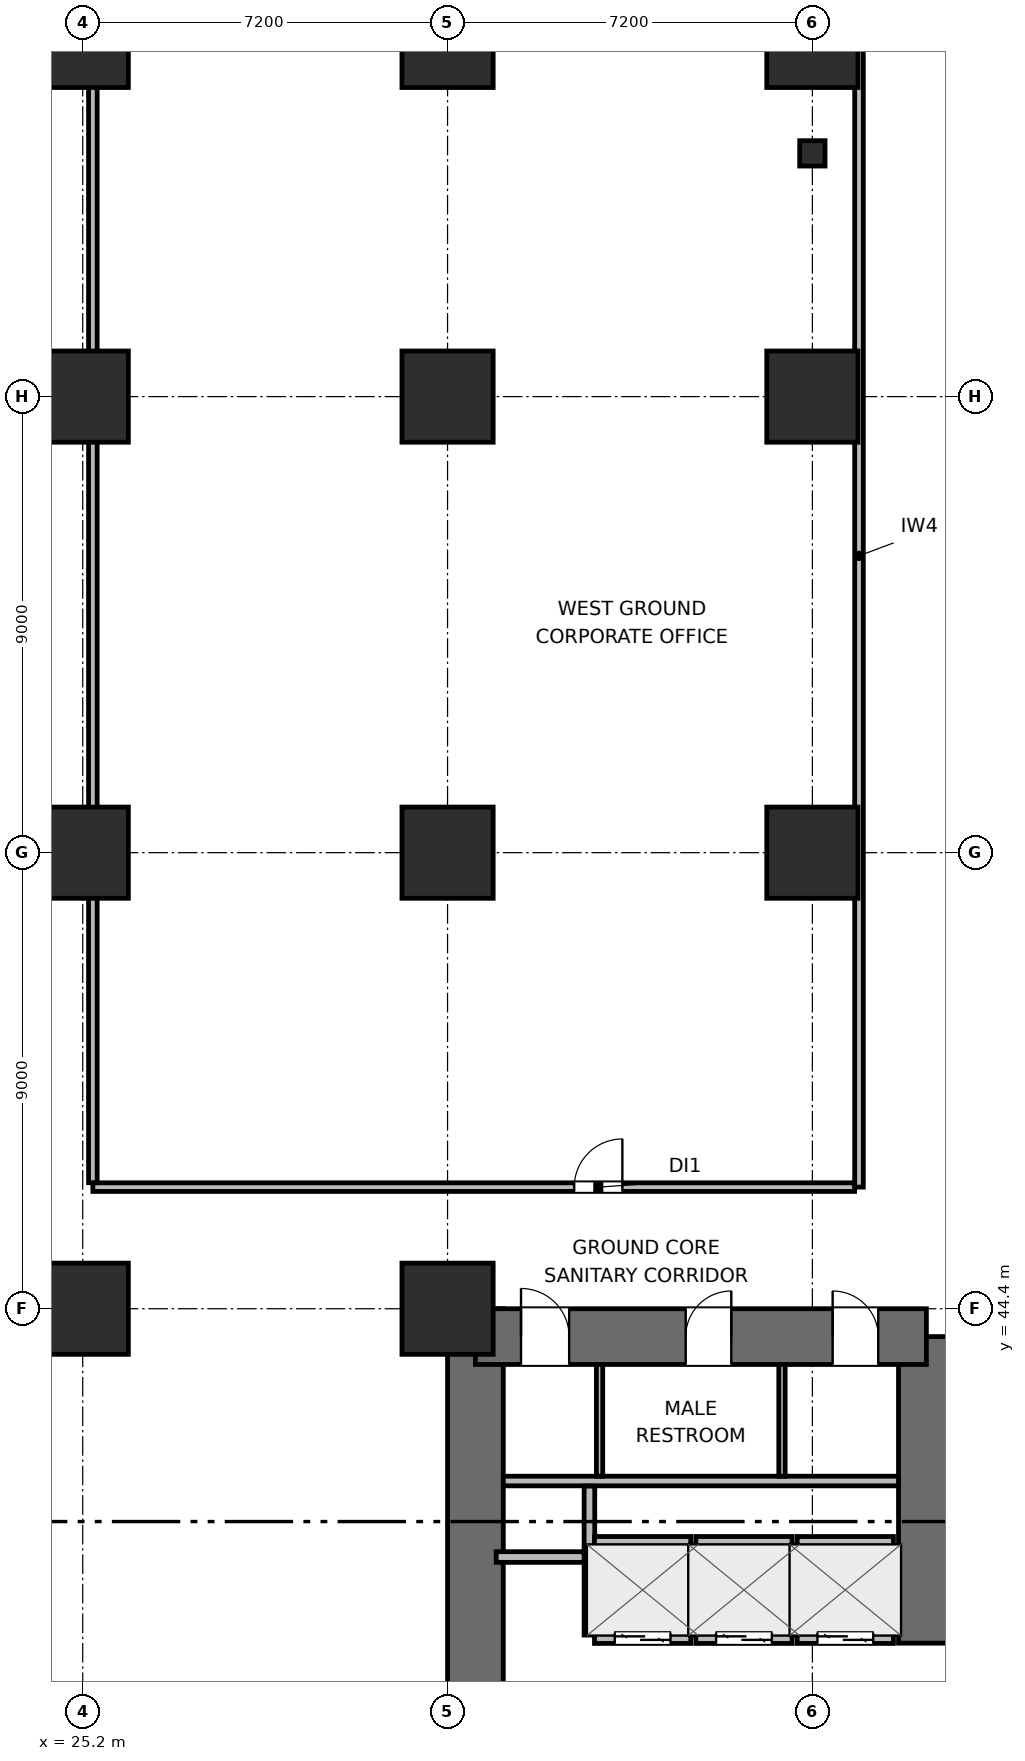
"""IFC4 building model, lengths in metres.
Left out: names, types, materials, properties, quantities, classifications, styles, units other than length and angle.
Written with IfcOpenShell. Run it as: python <this file> out.ifc"""

import sys

from ifc_helpers import new_model, si_unit, direction, frame, frame_2d, origin, origin_2d, place, context, subcontext, project, spatial, rectangle, hollow_rectangle, extrude, element, fill, save


model = new_model("IFC4")
c1 = context("Model", 3, precision=1e-05, world=origin(), true_north=direction((0.0, 1.0)))
c2 = subcontext(c1, "Body", "Model", "MODEL_VIEW")
j1 = project(units=[si_unit("LENGTHUNIT", "METRE"), si_unit("PLANEANGLEUNIT", "RADIAN")], contexts=[c1])
p1 = place(None, origin())
s1 = spatial("IfcSite", under=j1, at=p1, CompositionType="ELEMENT")
p2 = place(p1, origin())
s2 = spatial("IfcBuilding", under=s1, at=p2, CompositionType="ELEMENT")
p3 = place(p2, origin())
s3 = spatial("IfcBuildingStorey", under=s2, at=p3, CompositionType="ELEMENT", Elevation=0.0)
p4 = place(p3, frame((32.95, 27.6, 0.0), z_axis=(0.0, 0.0, 1.0), x_axis=(0.0, 1.0, 0.0)))
e1 = element("IfcWall", 1, at=p4, inside=s3, PredefinedType="SHEAR", context=c2, shape_type="SweptSolid", body=[
    extrude(rectangle(XDim=16.8, YDim=1.1, at=frame_2d((8.4, 0.0))), origin(), (0.0, 0.0, 1.0), 4.5),
])
p5 = place(p3, frame((41.85, 37.8, 0.0), z_axis=(0.0, 0.0, 1.0), x_axis=(0.0, 1.0, 0.0)))
e2 = element("IfcWall", 2, at=p5, inside=s3, PredefinedType="SHEAR", context=c2, shape_type="SweptSolid", body=[
    extrude(rectangle(XDim=6.05, YDim=1.1, at=frame_2d((3.025, 0.0))), origin(), (0.0, 0.0, 1.0), 4.5),
])
p6 = place(p3, frame((32.95, 43.85, 0.0), z_axis=(0.0, 0.0, 1.0), x_axis=(1.0, 0.0, 0.0)))
e3 = element("IfcWall", 3, at=p6, inside=s3, PredefinedType="SHEAR", context=c2, shape_type="SweptSolid", body=[
    extrude(rectangle(XDim=8.9, YDim=1.1, at=frame_2d((4.45, 0.0))), origin(), (0.0, 0.0, 1.0), 4.5),
])
p7 = place(p6, frame((0.9, 0.0, 0.0)))
e4 = element("IfcOpeningElement", 4, at=p7, cuts=e3, PredefinedType="OPENING", context=c2, shape_type="SweptSolid", body=[
    extrude(rectangle(XDim=0.95, YDim=2.04, at=frame_2d((0.475, 1.02))), frame((0.0, 0.56, 0.0), z_axis=(0.0, -1.0, 0.0), x_axis=(1.0, 0.0, 0.0)), (0.0, 0.0, 1.0), 1.12),
])
p8 = place(p6, frame((4.15, 0.0, 0.0)))
e5 = element("IfcOpeningElement", 5, at=p8, cuts=e3, PredefinedType="OPENING", context=c2, shape_type="SweptSolid", body=[
    extrude(rectangle(XDim=0.9, YDim=2.02, at=frame_2d((0.45, 1.01))), frame((0.0, 0.56, 0.0), z_axis=(0.0, -1.0, 0.0), x_axis=(1.0, 0.0, 0.0)), (0.0, 0.0, 1.0), 1.12),
])
p9 = place(p6, frame((7.05, 0.0, 0.0)))
e6 = element("IfcOpeningElement", 6, at=p9, cuts=e3, PredefinedType="OPENING", context=c2, shape_type="SweptSolid", body=[
    extrude(rectangle(XDim=0.9, YDim=2.02, at=frame_2d((0.45, 1.01))), frame((0.0, 0.56, 0.0), z_axis=(0.0, -1.0, 0.0), x_axis=(1.0, 0.0, 0.0)), (0.0, 0.0, 1.0), 1.12),
])
for number, where, z_axis, x_axis in (
    (7, (25.2, 44.4, 0.0), (0.0, 0.0, 1.0), (1.0, 0.0, 0.0)),
    (8, (25.2, 53.4, 0.0), (0.0, 0.0, 1.0), (1.0, 0.0, 0.0)),
    (9, (25.2, 62.4, 0.0), (0.0, 0.0, 1.0), (1.0, 0.0, 0.0)),
    (10, (25.2, 69.4, 0.0), (0.0, 0.0, 1.0), (1.0, 0.0, 0.0)),
    (11, (32.4, 44.4, 0.0), (0.0, 0.0, 1.0), (1.0, 0.0, 0.0)),
    (12, (32.4, 53.4, 0.0), (0.0, 0.0, 1.0), (1.0, 0.0, 0.0)),
    (13, (32.4, 62.4, 0.0), (0.0, 0.0, 1.0), (1.0, 0.0, 0.0)),
    (14, (32.4, 69.4, 0.0), (0.0, 0.0, 1.0), (1.0, 0.0, 0.0)),
    (15, (39.6, 53.4, 0.0), (0.0, 0.0, 1.0), (1.0, 0.0, 0.0)),
    (16, (39.6, 62.4, 0.0), (0.0, 0.0, 1.0), (1.0, 0.0, 0.0)),
    (17, (39.6, 69.4, 0.0), (0.0, 0.0, 1.0), (1.0, 0.0, 0.0)),
):
    element("IfcColumn", number, at=place(p3, frame(where, z_axis=z_axis, x_axis=x_axis)), inside=s3, PredefinedType="COLUMN", context=c2, shape_type="SweptSolid", body=[
        extrude(rectangle(XDim=1.8, YDim=1.8, at=origin_2d()), origin(), (0.0, 0.0, 1.0), 4.5),
    ])
p10 = place(p3, frame((39.6, 67.2, 0.0), z_axis=(0.0, 0.0, 1.0), x_axis=(1.0, 0.0, 0.0)))
e18 = element("IfcColumn", 18, at=p10, inside=s3, PredefinedType="PILASTER", context=c2, shape_type="SweptSolid", body=[
    extrude(hollow_rectangle(XDim=0.5, YDim=0.5, WallThickness=0.025, at=origin_2d()), origin(), (0.0, 0.0, 1.0), 4.18),
])
p11 = place(p3, frame((33.5, 41.0, 0.0), z_axis=(0.0, 0.0, 1.0), x_axis=(1.0, 0.0, 0.0)))
e19 = element("IfcWall", 19, at=p11, inside=s3, PredefinedType="PLUMBINGWALL", context=c2, shape_type="SweptSolid", body=[
    extrude(rectangle(XDim=7.8, YDim=0.19, at=frame_2d((3.9, 0.0))), origin(), (0.0, 0.0, 1.0), 4.18),
])
for number, where, z_axis, x_axis in (
    (20, (35.4, 41.095, 0.0), (0.0, 0.0, 1.0), (0.0, 1.0, 0.0)),
    (21, (39.0, 41.095, 0.0), (0.0, 0.0, 1.0), (0.0, 1.0, 0.0)),
):
    element("IfcWall", number, at=place(p3, frame(where, z_axis=z_axis, x_axis=x_axis)), inside=s3, PredefinedType="PARTITIONING", context=c2, shape_type="SweptSolid", body=[
        extrude(rectangle(XDim=2.205, YDim=0.125, at=frame_2d((1.103, 0.0))), origin(), (0.0, 0.0, 1.0), 4.18),
    ])
p12 = place(p3, frame((33.36, 39.5, 0.0), z_axis=(0.0, 0.0, 1.0), x_axis=(1.0, 0.0, 0.0)))
e22 = element("IfcWall", 22, at=p12, inside=s3, PredefinedType="PARTITIONING", context=c2, shape_type="SweptSolid", body=[
    extrude(rectangle(XDim=1.86, YDim=0.21, at=frame_2d((0.93, 0.0))), origin(), (0.0, 0.0, 1.0), 4.18),
])
p13 = place(p3, frame((35.2, 39.58, 0.0), z_axis=(0.0, 0.0, 1.0), x_axis=(0.0, 1.0, 0.0)))
e23 = element("IfcWall", 23, at=p13, inside=s3, PredefinedType="PARTITIONING", context=c2, shape_type="SweptSolid", body=[
    extrude(rectangle(XDim=1.32, YDim=0.21, at=frame_2d((0.66, 0.0))), origin(), (0.0, 0.0, 1.0), 4.18),
])
p14 = place(p3, frame((35.3, 37.9, 0.0), z_axis=(0.0, 0.0, 1.0), x_axis=(1.0, 0.0, 0.0)))
e24 = element("IfcWall", 24, at=p14, inside=s3, PredefinedType="PARTITIONING", context=c2, shape_type="SweptSolid", body=[
    extrude(rectangle(XDim=1.9, YDim=0.21, at=frame_2d((0.95, 0.0))), origin(), (0.0, 0.0, 1.0), 4.18),
])
p15 = place(p14, frame((0.4, 0.0, 0.0)))
e25 = element("IfcOpeningElement", 25, at=p15, cuts=e24, PredefinedType="OPENING", context=c2, shape_type="SweptSolid", body=[
    extrude(rectangle(XDim=1.1, YDim=2.04, at=frame_2d((0.55, 1.02))), frame((0.0, 0.115, 0.0), z_axis=(0.0, -1.0, 0.0), x_axis=(1.0, 0.0, 0.0)), (0.0, 0.0, 1.0), 0.23),
])
p16 = place(p3, frame((35.3, 39.8, 0.0), z_axis=(0.0, 0.0, 1.0), x_axis=(1.0, 0.0, 0.0)))
e26 = element("IfcWall", 26, at=p16, inside=s3, PredefinedType="PARTITIONING", context=c2, shape_type="SweptSolid", body=[
    extrude(rectangle(XDim=1.9, YDim=0.21, at=frame_2d((0.95, 0.0))), origin(), (0.0, 0.0, 1.0), 4.18),
])
p17 = place(p3, frame((35.2, 37.96, 0.0), z_axis=(0.0, 0.0, 1.0), x_axis=(0.0, 1.0, 0.0)))
e27 = element("IfcWall", 27, at=p17, inside=s3, PredefinedType="PARTITIONING", context=c2, shape_type="SweptSolid", body=[
    extrude(rectangle(XDim=1.62, YDim=0.21, at=frame_2d((0.81, 0.0))), origin(), (0.0, 0.0, 1.0), 4.18),
])
p18 = place(p3, frame((37.3, 37.96, 0.0), z_axis=(0.0, 0.0, 1.0), x_axis=(0.0, 1.0, 0.0)))
e28 = element("IfcWall", 28, at=p18, inside=s3, PredefinedType="PARTITIONING", context=c2, shape_type="SweptSolid", body=[
    extrude(rectangle(XDim=1.78, YDim=0.21, at=frame_2d((0.89, 0.0))), origin(), (0.0, 0.0, 1.0), 4.18),
])
p19 = place(p3, frame((37.3, 37.9, 0.0), z_axis=(0.0, 0.0, 1.0), x_axis=(1.0, 0.0, 0.0)))
e29 = element("IfcWall", 29, at=p19, inside=s3, PredefinedType="PARTITIONING", context=c2, shape_type="SweptSolid", body=[
    extrude(rectangle(XDim=1.9, YDim=0.21, at=frame_2d((0.95, 0.0))), origin(), (0.0, 0.0, 1.0), 4.18),
])
p20 = place(p19, frame((0.4, 0.0, 0.0)))
e30 = element("IfcOpeningElement", 30, at=p20, cuts=e29, PredefinedType="OPENING", context=c2, shape_type="SweptSolid", body=[
    extrude(rectangle(XDim=1.1, YDim=2.04, at=frame_2d((0.55, 1.02))), frame((0.0, 0.115, 0.0), z_axis=(0.0, -1.0, 0.0), x_axis=(1.0, 0.0, 0.0)), (0.0, 0.0, 1.0), 0.23),
])
p21 = place(p3, frame((37.3, 39.8, 0.0), z_axis=(0.0, 0.0, 1.0), x_axis=(1.0, 0.0, 0.0)))
e31 = element("IfcWall", 31, at=p21, inside=s3, PredefinedType="PARTITIONING", context=c2, shape_type="SweptSolid", body=[
    extrude(rectangle(XDim=1.9, YDim=0.21, at=frame_2d((0.95, 0.0))), origin(), (0.0, 0.0, 1.0), 4.18),
])
p22 = place(p3, frame((39.3, 37.96, 0.0), z_axis=(0.0, 0.0, 1.0), x_axis=(0.0, 1.0, 0.0)))
e32 = element("IfcWall", 32, at=p22, inside=s3, PredefinedType="PARTITIONING", context=c2, shape_type="SweptSolid", body=[
    extrude(rectangle(XDim=1.78, YDim=0.21, at=frame_2d((0.89, 0.0))), origin(), (0.0, 0.0, 1.0), 4.18),
])
p23 = place(p3, frame((39.3, 37.9, 0.0), z_axis=(0.0, 0.0, 1.0), x_axis=(1.0, 0.0, 0.0)))
e33 = element("IfcWall", 33, at=p23, inside=s3, PredefinedType="PARTITIONING", context=c2, shape_type="SweptSolid", body=[
    extrude(rectangle(XDim=1.9, YDim=0.21, at=frame_2d((0.95, 0.0))), origin(), (0.0, 0.0, 1.0), 4.18),
])
p24 = place(p23, frame((0.4, 0.0, 0.0)))
e34 = element("IfcOpeningElement", 34, at=p24, cuts=e33, PredefinedType="OPENING", context=c2, shape_type="SweptSolid", body=[
    extrude(rectangle(XDim=1.1, YDim=2.04, at=frame_2d((0.55, 1.02))), frame((0.0, 0.115, 0.0), z_axis=(0.0, -1.0, 0.0), x_axis=(1.0, 0.0, 0.0)), (0.0, 0.0, 1.0), 0.23),
])
p25 = place(p3, frame((39.3, 39.8, 0.0), z_axis=(0.0, 0.0, 1.0), x_axis=(1.0, 0.0, 0.0)))
e35 = element("IfcWall", 35, at=p25, inside=s3, PredefinedType="PARTITIONING", context=c2, shape_type="SweptSolid", body=[
    extrude(rectangle(XDim=1.9, YDim=0.21, at=frame_2d((0.95, 0.0))), origin(), (0.0, 0.0, 1.0), 4.18),
])
p26 = place(p3, frame((40.52, 46.8, 0.0), z_axis=(0.0, 0.0, 1.0), x_axis=(0.0, 1.0, 0.0)))
e36 = element("IfcWall", 36, at=p26, inside=s3, PredefinedType="PARTITIONING", context=c2, shape_type="SweptSolid", body=[
    extrude(rectangle(XDim=24.915, YDim=0.17, at=frame_2d((12.458, 0.0))), origin(), (0.0, 0.0, 1.0), 4.18),
])
p27 = place(p3, frame((25.4, 46.8, 0.0), z_axis=(0.0, 0.0, 1.0), x_axis=(1.0, 0.0, 0.0)))
e37 = element("IfcWall", 37, at=p27, inside=s3, PredefinedType="PARTITIONING", context=c2, shape_type="SweptSolid", body=[
    extrude(rectangle(XDim=15.033, YDim=0.17, at=frame_2d((7.517, 0.0))), origin(), (0.0, 0.0, 1.0), 4.18),
])
p28 = place(p27, frame((9.5, 0.0, 0.0)))
e38 = element("IfcOpeningElement", 38, at=p28, cuts=e37, PredefinedType="OPENING", context=c2, shape_type="SweptSolid", body=[
    extrude(rectangle(XDim=0.95, YDim=2.04, at=frame_2d((0.475, 1.02))), frame((0.0, 0.095, 0.0), z_axis=(0.0, -1.0, 0.0), x_axis=(1.0, 0.0, 0.0)), (0.0, 0.0, 1.0), 0.19),
])
p29 = place(p3, frame((25.4, 46.887, 0.0), z_axis=(0.0, 0.0, 1.0), x_axis=(0.0, 1.0, 0.0)))
e39 = element("IfcWall", 39, at=p29, inside=s3, PredefinedType="PARTITIONING", context=c2, shape_type="SweptSolid", body=[
    extrude(rectangle(XDim=24.748, YDim=0.17, at=frame_2d((12.374, 0.0))), origin(), (0.0, 0.0, 1.0), 3.392),
])
p30 = place(p15, origin())
e40 = element("IfcDoor", 40, at=p30, inside=s3, OperationType="DOUBLE_DOOR_SLIDING", PredefinedType="DOOR", context=c2, shape_type="SweptSolid", body=[
    extrude(rectangle(XDim=1.1, YDim=2.04, at=frame_2d((0.55, 1.02))), frame((0.0, 0.025, 0.0), z_axis=(0.0, -1.0, 0.0), x_axis=(1.0, 0.0, 0.0)), (0.0, 0.0, 1.0), 0.05),
])
fill(e25, e40)
p31 = place(p20, origin())
e41 = element("IfcDoor", 41, at=p31, inside=s3, OperationType="DOUBLE_DOOR_SLIDING", PredefinedType="DOOR", context=c2, shape_type="SweptSolid", body=[
    extrude(rectangle(XDim=1.1, YDim=2.04, at=frame_2d((0.55, 1.02))), frame((0.0, 0.025, 0.0), z_axis=(0.0, -1.0, 0.0), x_axis=(1.0, 0.0, 0.0)), (0.0, 0.0, 1.0), 0.05),
])
fill(e30, e41)
p32 = place(p24, origin())
e42 = element("IfcDoor", 42, at=p32, inside=s3, OperationType="DOUBLE_DOOR_SLIDING", PredefinedType="DOOR", context=c2, shape_type="SweptSolid", body=[
    extrude(rectangle(XDim=1.1, YDim=2.04, at=frame_2d((0.55, 1.02))), frame((0.0, 0.025, 0.0), z_axis=(0.0, -1.0, 0.0), x_axis=(1.0, 0.0, 0.0)), (0.0, 0.0, 1.0), 0.05),
])
fill(e34, e42)
p33 = place(p7, origin())
e43 = element("IfcDoor", 43, at=p33, inside=s3, OperationType="SINGLE_SWING_LEFT", PredefinedType="DOOR", context=c2, shape_type="SweptSolid", body=[
    extrude(rectangle(XDim=0.95, YDim=2.04, at=frame_2d((0.475, 1.02))), frame((0.0, 0.025, 0.0), z_axis=(0.0, -1.0, 0.0), x_axis=(1.0, 0.0, 0.0)), (0.0, 0.0, 1.0), 0.05),
])
fill(e4, e43)
p34 = place(p8, origin())
e44 = element("IfcDoor", 44, at=p34, inside=s3, OperationType="SINGLE_SWING_RIGHT", PredefinedType="DOOR", context=c2, shape_type="SweptSolid", body=[
    extrude(rectangle(XDim=0.9, YDim=2.02, at=frame_2d((0.45, 1.01))), frame((0.0, 0.025, 0.0), z_axis=(0.0, -1.0, 0.0), x_axis=(1.0, 0.0, 0.0)), (0.0, 0.0, 1.0), 0.05),
])
fill(e5, e44)
p35 = place(p9, origin())
e45 = element("IfcDoor", 45, at=p35, inside=s3, OperationType="SINGLE_SWING_LEFT", PredefinedType="DOOR", context=c2, shape_type="SweptSolid", body=[
    extrude(rectangle(XDim=0.9, YDim=2.02, at=frame_2d((0.45, 1.01))), frame((0.0, 0.025, 0.0), z_axis=(0.0, -1.0, 0.0), x_axis=(1.0, 0.0, 0.0)), (0.0, 0.0, 1.0), 0.05),
])
fill(e6, e45)
p36 = place(p28, origin())
e46 = element("IfcDoor", 46, at=p36, inside=s3, OperationType="SINGLE_SWING_RIGHT", PredefinedType="DOOR", context=c2, shape_type="SweptSolid", body=[
    extrude(rectangle(XDim=0.95, YDim=2.04, at=frame_2d((0.475, 1.02))), frame((0.0, 0.025, 0.0), z_axis=(0.0, -1.0, 0.0), x_axis=(1.0, 0.0, 0.0)), (0.0, 0.0, 1.0), 0.05),
])
fill(e38, e46)
save(model, sys.argv[1])
